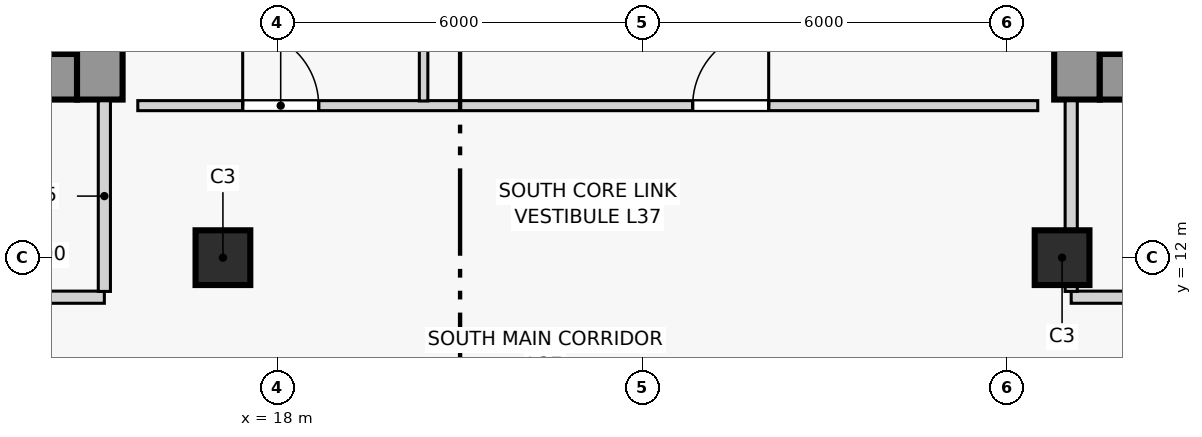
"""IFC4 building model, lengths in metres.
Left out: names, types, materials, properties, quantities, classifications, styles, units other than length and angle.
Written with IfcOpenShell. Run it as: python <this file> out.ifc"""

import sys

from ifc_helpers import new_model, si_unit, direction, frame, frame_2d, origin, origin_2d, place, context, subcontext, project, spatial, rectangle, extrude, source, transform, mapped, element, fill, save


model = new_model("IFC4")
c1 = context("Model", 3, precision=1e-05, world=origin(), true_north=direction((0.0, 1.0)))
c2 = subcontext(c1, "Body", "Model", "MODEL_VIEW")
j1 = project(units=[si_unit("LENGTHUNIT", "METRE"), si_unit("PLANEANGLEUNIT", "RADIAN")], contexts=[c1])
p1 = place(None, origin())
s1 = spatial("IfcSite", under=j1, at=p1, CompositionType="ELEMENT")
p2 = place(p1, origin())
s2 = spatial("IfcBuilding", under=s1, at=p2, CompositionType="ELEMENT")
p3 = place(p2, frame((0.0, 0.0, 141.3)))
s3 = spatial("IfcBuildingStorey", under=s2, at=p3, CompositionType="ELEMENT", Elevation=141.3)
p4 = place(p3, frame((15.075, 14.6, 0.0), z_axis=(0.0, 0.0, 1.0), x_axis=(0.0, 1.0, 0.0)))
e1 = element("IfcWall", 1, at=p4, inside=s3, PredefinedType="SHEAR", context=c2, shape_type="SweptSolid", body=[
    extrude(rectangle(XDim=12.85, YDim=0.75, at=frame_2d((6.425, 0.0))), origin(), (0.0, 0.0, 1.0), 3.6),
])
p5 = place(p4, frame((5.5, 0.0, 0.0)))
e2 = element("IfcOpeningElement", 2, at=p5, cuts=e1, PredefinedType="OPENING", context=c2, shape_type="SweptSolid", body=[
    extrude(rectangle(XDim=1.1, YDim=2.2, at=frame_2d((0.55, 1.1))), frame((0.0, 0.385, 0.0), z_axis=(0.0, -1.0, 0.0), x_axis=(1.0, 0.0, 0.0)), (0.0, 0.0, 1.0), 0.77),
])
p6 = place(p3, frame((8.15, 14.975, 0.0), z_axis=(0.0, 0.0, 1.0), x_axis=(1.0, 0.0, 0.0)))
e3 = element("IfcWall", 3, at=p6, inside=s3, PredefinedType="SHEAR", context=c2, shape_type="SweptSolid", body=[
    extrude(rectangle(XDim=6.55, YDim=0.75, at=frame_2d((3.275, 0.0))), origin(), (0.0, 0.0, 1.0), 3.6),
])
p7 = place(p6, frame((0.9, 0.0, 0.0)))
e4 = element("IfcOpeningElement", 4, at=p7, cuts=e3, PredefinedType="OPENING", context=c2, shape_type="SweptSolid", body=[
    extrude(rectangle(XDim=1.1, YDim=2.2, at=frame_2d((0.55, 1.1))), frame((0.0, 0.385, 0.0), z_axis=(0.0, -1.0, 0.0), x_axis=(1.0, 0.0, 0.0)), (0.0, 0.0, 1.0), 0.77),
])
p8 = place(p6, frame((4.4, 0.0, 0.0)))
e5 = element("IfcOpeningElement", 5, at=p8, cuts=e3, PredefinedType="OPENING", context=c2, shape_type="SweptSolid", body=[
    extrude(rectangle(XDim=1.3, YDim=2.2, at=frame_2d((0.65, 1.1))), frame((0.0, 0.385, 0.0), z_axis=(0.0, -1.0, 0.0), x_axis=(1.0, 0.0, 0.0)), (0.0, 0.0, 1.0), 0.77),
])
p9 = place(p3, frame((31.145, 14.6, 0.0), z_axis=(0.0, 0.0, 1.0), x_axis=(0.0, 1.0, 0.0)))
e6 = element("IfcWall", 6, at=p9, inside=s3, PredefinedType="SHEAR", context=c2, shape_type="SweptSolid", body=[
    extrude(rectangle(XDim=12.85, YDim=0.75, at=frame_2d((6.425, 0.0))), origin(), (0.0, 0.0, 1.0), 3.6),
])
p10 = place(p3, frame((31.52, 14.975, 0.0), z_axis=(0.0, 0.0, 1.0), x_axis=(1.0, 0.0, 0.0)))
e7 = element("IfcWall", 7, at=p10, inside=s3, PredefinedType="SHEAR", context=c2, shape_type="SweptSolid", body=[
    extrude(rectangle(XDim=5.38, YDim=0.75, at=frame_2d((2.69, 0.0))), origin(), (0.0, 0.0, 1.0), 3.6),
])
p11 = place(p10, frame((0.83, 0.0, 0.0)))
e8 = element("IfcOpeningElement", 8, at=p11, cuts=e7, PredefinedType="OPENING", context=c2, shape_type="SweptSolid", body=[
    extrude(rectangle(XDim=1.1, YDim=2.2, at=frame_2d((0.55, 1.1))), frame((0.0, 0.385, 0.0), z_axis=(0.0, -1.0, 0.0), x_axis=(1.0, 0.0, 0.0)), (0.0, 0.0, 1.0), 0.77),
])
p12 = place(p10, frame((3.68, 0.0, 0.0)))
e9 = element("IfcOpeningElement", 9, at=p12, cuts=e7, PredefinedType="OPENING", context=c2, shape_type="SweptSolid", body=[
    extrude(rectangle(XDim=1.3, YDim=2.2, at=frame_2d((0.65, 1.1))), frame((0.0, 0.385, 0.0), z_axis=(0.0, -1.0, 0.0), x_axis=(1.0, 0.0, 0.0)), (0.0, 0.0, 1.0), 0.77),
])
m1 = source(origin(), c2, "Body", "SweptSolid", [
    extrude(rectangle(XDim=0.9, YDim=0.9, at=origin_2d()), origin(), (0.0, 0.0, 1.0), 3.6),
])
for number, where, z_axis, x_axis in (
    (10, (17.1, 12.0, 0.0), (0.0, 0.0, 1.0), (1.0, 0.0, 0.0)),
    (11, (30.9, 12.0, 0.0), (0.0, 0.0, 1.0), (1.0, 0.0, 0.0)),
):
    element("IfcColumn", number, at=place(p3, frame(where, z_axis=z_axis, x_axis=x_axis)), inside=s3, PredefinedType="COLUMN", context=c2, shape_type="MappedRepresentation", body=[
        mapped(m1, transform((0.0, 0.0, 0.0), scale=1.0)),
    ])
p13 = place(p3, frame((8.05, 11.35, 0.0), z_axis=(0.0, 0.0, 1.0), x_axis=(1.0, 0.0, 0.0)))
e12 = element("IfcWall", 12, at=p13, inside=s3, PredefinedType="PARTITIONING", context=c2, shape_type="SweptSolid", body=[
    extrude(rectangle(XDim=7.1, YDim=0.2, at=frame_2d((3.55, 0.0))), origin(), (0.0, 0.0, 1.0), 3.32),
])
p14 = place(p13, frame((2.846, 0.0, 0.0)))
e13 = element("IfcOpeningElement", 13, at=p14, cuts=e12, PredefinedType="OPENING", context=c2, shape_type="SweptSolid", body=[
    extrude(rectangle(XDim=1.2, YDim=2.2, at=frame_2d((0.6, 1.1))), frame((0.0, 0.11, 0.0), z_axis=(0.0, -1.0, 0.0), x_axis=(1.0, 0.0, 0.0)), (0.0, 0.0, 1.0), 0.22),
])
p15 = place(p3, frame((15.15, 11.445, 0.0), z_axis=(0.0, 0.0, 1.0), x_axis=(0.0, 1.0, 0.0)))
e14 = element("IfcWall", 14, at=p15, inside=s3, PredefinedType="PARTITIONING", context=c2, shape_type="SweptSolid", body=[
    extrude(rectangle(XDim=3.135, YDim=0.2, at=frame_2d((1.567, 0.0))), origin(), (0.0, 0.0, 1.0), 3.32),
])
p16 = place(p3, frame((31.05, 11.35, 0.0), z_axis=(0.0, 0.0, 1.0), x_axis=(1.0, 0.0, 0.0)))
e15 = element("IfcWall", 15, at=p16, inside=s3, PredefinedType="PARTITIONING", context=c2, shape_type="SweptSolid", body=[
    extrude(rectangle(XDim=6.2, YDim=0.2, at=frame_2d((3.1, 0.0))), origin(), (0.0, 0.0, 1.0), 3.32),
])
p17 = place(p16, frame((2.586, 0.0, 0.0)))
e16 = element("IfcOpeningElement", 16, at=p17, cuts=e15, PredefinedType="OPENING", context=c2, shape_type="SweptSolid", body=[
    extrude(rectangle(XDim=1.2, YDim=2.2, at=frame_2d((0.6, 1.1))), frame((0.0, 0.11, 0.0), z_axis=(0.0, -1.0, 0.0), x_axis=(1.0, 0.0, 0.0)), (0.0, 0.0, 1.0), 0.22),
])
p18 = place(p3, frame((31.05, 11.445, 0.0), z_axis=(0.0, 0.0, 1.0), x_axis=(0.0, 1.0, 0.0)))
e17 = element("IfcWall", 17, at=p18, inside=s3, PredefinedType="PARTITIONING", context=c2, shape_type="SweptSolid", body=[
    extrude(rectangle(XDim=3.135, YDim=0.2, at=frame_2d((1.567, 0.0))), origin(), (0.0, 0.0, 1.0), 2.776),
])
p19 = place(p3, frame((15.7, 14.5, 0.0), z_axis=(0.0, 0.0, 1.0), x_axis=(1.0, 0.0, 0.0)))
e18 = element("IfcWall", 18, at=p19, inside=s3, PredefinedType="PARTITIONING", context=c2, shape_type="SweptSolid", body=[
    extrude(rectangle(XDim=14.8, YDim=0.165, at=frame_2d((7.4, 0.0))), origin(), (0.0, 0.0, 1.0), 3.32),
])
p20 = place(p19, frame((1.725, 0.0, 0.0)))
e19 = element("IfcOpeningElement", 19, at=p20, cuts=e18, PredefinedType="OPENING", context=c2, shape_type="SweptSolid", body=[
    extrude(rectangle(XDim=1.25, YDim=2.2, at=frame_2d((0.625, 1.1))), frame((0.0, 0.093, 0.0), z_axis=(0.0, -1.0, 0.0), x_axis=(1.0, 0.0, 0.0)), (0.0, 0.0, 1.0), 0.185),
])
p21 = place(p19, frame((9.125, 0.0, 0.0)))
e20 = element("IfcOpeningElement", 20, at=p21, cuts=e18, PredefinedType="OPENING", context=c2, shape_type="SweptSolid", body=[
    extrude(rectangle(XDim=1.25, YDim=2.2, at=frame_2d((0.625, 1.1))), frame((0.0, 0.093, 0.0), z_axis=(0.0, -1.0, 0.0), x_axis=(1.0, 0.0, 0.0)), (0.0, 0.0, 1.0), 0.185),
])
p22 = place(p3, frame((20.4, 14.577, 0.0), z_axis=(0.0, 0.0, 1.0), x_axis=(0.0, 1.0, 0.0)))
e21 = element("IfcWall", 21, at=p22, inside=s3, PredefinedType="PARTITIONING", context=c2, shape_type="SweptSolid", body=[
    extrude(rectangle(XDim=12.845, YDim=0.14, at=frame_2d((6.423, 0.0))), origin(), (0.0, 0.0, 1.0), 3.32),
])
m2 = source(origin(), c2, "Body", "SweptSolid", [
    extrude(rectangle(XDim=1.25, YDim=2.2, at=frame_2d((0.625, 1.1))), frame((0.0, 0.025, 0.0), z_axis=(0.0, -1.0, 0.0), x_axis=(1.0, 0.0, 0.0)), (0.0, 0.0, 1.0), 0.05),
])
p23 = place(p20, origin())
e22 = element("IfcDoor", 22, at=p23, inside=s3, OperationType="SINGLE_SWING_LEFT", PredefinedType="DOOR", context=c2, shape_type="MappedRepresentation", body=[
    mapped(m2, transform((0.0, 0.0, 0.0), scale=1.0)),
])
fill(e19, e22)
p24 = place(p21, origin())
e23 = element("IfcDoor", 23, at=p24, inside=s3, OperationType="SINGLE_SWING_RIGHT", PredefinedType="DOOR", context=c2, shape_type="MappedRepresentation", body=[
    mapped(m2, transform((0.0, 0.0, 0.0), scale=1.0)),
])
fill(e20, e23)
save(model, sys.argv[1])
